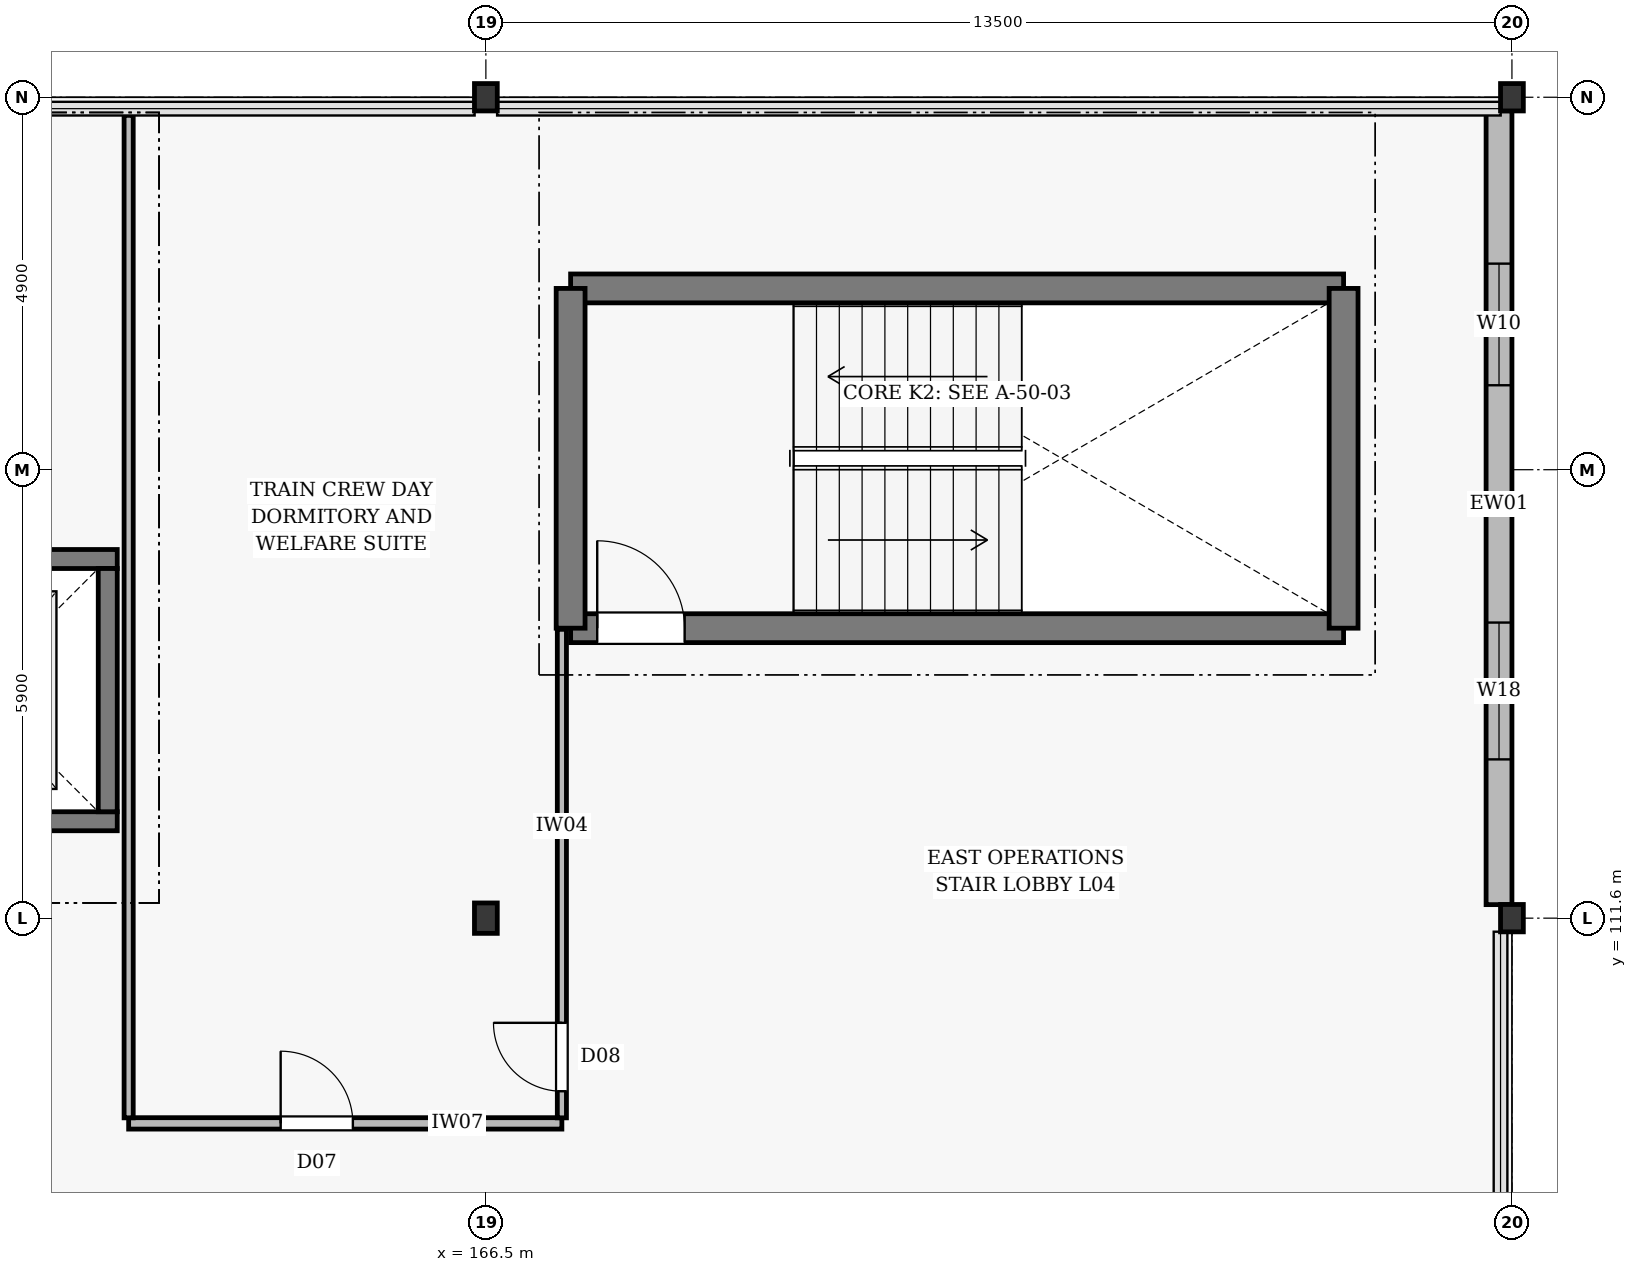
"""IFC4 building model, lengths in metres.
Left out: names, types, materials, properties, quantities, classifications, styles, units other than length and angle.
Written with IfcOpenShell. Run it as: python <this file> out.ifc"""

import sys

from ifc_helpers import new_model, si_unit, direction, frame, frame_2d, origin, origin_2d, place, context, subcontext, project, spatial, rectangle, i_section, extrude, element, fill, save


model = new_model("IFC4")
c1 = context("Model", 3, precision=1e-05, world=origin(), true_north=direction((0.0, 1.0)))
c2 = subcontext(c1, "Body", "Model", "MODEL_VIEW")
j1 = project(units=[si_unit("LENGTHUNIT", "METRE"), si_unit("PLANEANGLEUNIT", "RADIAN")], contexts=[c1])
p1 = place(None, origin())
s1 = spatial("IfcSite", under=j1, at=p1, CompositionType="ELEMENT")
p2 = place(p1, origin())
s2 = spatial("IfcBuilding", under=s1, at=p2, CompositionType="ELEMENT")
p3 = place(p2, frame((0.0, 0.0, 21.3)))
s3 = spatial("IfcBuildingStorey", under=s2, at=p3, CompositionType="ELEMENT", Elevation=21.3)
p4 = place(p3, frame((166.5, 111.6, 0.0), z_axis=(0.0, 0.0, 1.0), x_axis=(1.0, 0.0, 0.0)))
e1 = element("IfcColumn", 1, at=p4, inside=s3, PredefinedType="COLUMN", context=c2, shape_type="SweptSolid", body=[
    extrude(i_section(OverallWidth=0.3, OverallDepth=0.4, WebThickness=0.013, FlangeThickness=0.024, at=origin_2d()), origin(), (0.0, 0.0, 1.0), 3.9),
])
for number, where, z_axis, x_axis in (
    (2, (166.5, 122.4, 0.0), (0.0, 0.0, 1.0), (1.0, 0.0, 0.0)),
    (3, (180.0, 111.6, 0.0), (0.0, 0.0, 1.0), (1.0, 0.0, 0.0)),
    (4, (180.0, 122.4, 0.0), (0.0, 0.0, 1.0), (1.0, 0.0, 0.0)),
):
    element("IfcColumn", number, at=place(p3, frame(where, z_axis=z_axis, x_axis=x_axis)), inside=s3, PredefinedType="COLUMN", context=c2, shape_type="SweptSolid", body=[
        extrude(i_section(OverallWidth=0.3, OverallDepth=0.36, WebThickness=0.012, FlangeThickness=0.022, at=origin_2d()), origin(), (0.0, 0.0, 1.0), 3.9),
    ])
p5 = place(p3, frame((179.83, 122.222, 0.0), z_axis=(0.0, 0.0, 1.0), x_axis=(0.0, -1.0, 0.0)))
e5 = element("IfcWall", 5, at=p5, inside=s3, PredefinedType="STANDARD", context=c2, shape_type="SweptSolid", body=[
    extrude(rectangle(XDim=10.444, YDim=0.34, at=frame_2d((5.222, 0.0))), origin(), (0.0, 0.0, 1.0), 3.12),
])
p6 = place(p5, frame((2.011, 0.0, 0.75)))
e6 = element("IfcOpeningElement", 6, at=p6, cuts=e5, PredefinedType="OPENING", context=c2, shape_type="SweptSolid", body=[
    extrude(rectangle(XDim=1.6, YDim=2.1, at=frame_2d((0.8, 1.05))), frame((0.0, 0.182, 0.0), z_axis=(0.0, -1.0, 0.0), x_axis=(1.0, 0.0, 0.0)), (0.0, 0.0, 1.0), 0.364),
])
p7 = place(p5, frame((6.733, 0.0, 1.05)))
e7 = element("IfcOpeningElement", 7, at=p7, cuts=e5, PredefinedType="OPENING", context=c2, shape_type="SweptSolid", body=[
    extrude(rectangle(XDim=1.8, YDim=1.1, at=frame_2d((0.9, 0.55))), frame((0.0, 0.182, 0.0), z_axis=(0.0, -1.0, 0.0), x_axis=(1.0, 0.0, 0.0)), (0.0, 0.0, 1.0), 0.364),
])
p8 = place(p3, frame((167.615, 115.415, 0.0), z_axis=(0.0, 0.0, 1.0), x_axis=(1.0, 0.0, 0.0)))
e8 = element("IfcWall", 8, at=p8, inside=s3, PredefinedType="SOLIDWALL", context=c2, shape_type="SweptSolid", body=[
    extrude(rectangle(XDim=10.17, YDim=0.38, at=frame_2d((5.085, 0.0))), origin(), (0.0, 0.0, 1.0), 3.9),
])
p9 = place(p8, frame((0.35, 0.0, 0.005)))
e9 = element("IfcOpeningElement", 9, at=p9, cuts=e8, PredefinedType="OPENING", context=c2, shape_type="SweptSolid", body=[
    extrude(rectangle(XDim=1.15, YDim=2.15, at=frame_2d((0.575, 1.075))), frame((0.0, 0.202, 0.0), z_axis=(0.0, -1.0, 0.0), x_axis=(1.0, 0.0, 0.0)), (0.0, 0.0, 1.0), 0.404),
])
p10 = place(p3, frame((167.615, 119.885, 0.0), z_axis=(0.0, 0.0, 1.0), x_axis=(1.0, 0.0, 0.0)))
e10 = element("IfcWall", 10, at=p10, inside=s3, PredefinedType="SOLIDWALL", context=c2, shape_type="SweptSolid", body=[
    extrude(rectangle(XDim=10.17, YDim=0.38, at=frame_2d((5.085, 0.0))), origin(), (0.0, 0.0, 1.0), 3.9),
])
for number, where, z_axis, x_axis in (
    (11, (167.615, 115.415, 0.0), (0.0, 0.0, 1.0), (0.0, 1.0, 0.0)),
    (12, (177.785, 115.415, 0.0), (0.0, 0.0, 1.0), (0.0, 1.0, 0.0)),
):
    element("IfcWall", number, at=place(p3, frame(where, z_axis=z_axis, x_axis=x_axis)), inside=s3, PredefinedType="SOLIDWALL", context=c2, shape_type="SweptSolid", body=[
        extrude(rectangle(XDim=4.47, YDim=0.38, at=frame_2d((2.235, 0.0))), origin(), (0.0, 0.0, 1.0), 3.9),
    ])
p11 = place(p3, frame((157.95, 112.875, 0.0), z_axis=(0.0, 0.0, 1.0), x_axis=(1.0, 0.0, 0.0)))
e13 = element("IfcWall", 13, at=p11, inside=s3, PredefinedType="SOLIDWALL", context=c2, shape_type="SweptSolid", body=[
    extrude(rectangle(XDim=3.7, YDim=0.25, at=frame_2d((1.85, 0.0))), origin(), (0.0, 0.0, 1.0), 3.9),
])
p12 = place(p11, frame((1.225, 0.0, 0.005)))
e14 = element("IfcOpeningElement", 14, at=p12, cuts=e13, PredefinedType="OPENING", context=c2, shape_type="SweptSolid", body=[
    extrude(rectangle(XDim=1.25, YDim=2.2, at=frame_2d((0.625, 1.1))), frame((0.0, 0.137, 0.0), z_axis=(0.0, -1.0, 0.0), x_axis=(1.0, 0.0, 0.0)), (0.0, 0.0, 1.0), 0.274),
])
p13 = place(p3, frame((157.95, 116.325, 0.0), z_axis=(0.0, 0.0, 1.0), x_axis=(1.0, 0.0, 0.0)))
e15 = element("IfcWall", 15, at=p13, inside=s3, PredefinedType="SOLIDWALL", context=c2, shape_type="SweptSolid", body=[
    extrude(rectangle(XDim=3.7, YDim=0.25, at=frame_2d((1.85, 0.0))), origin(), (0.0, 0.0, 1.0), 3.9),
])
p14 = place(p3, frame((161.525, 113.0, 0.0), z_axis=(0.0, 0.0, 1.0), x_axis=(0.0, 1.0, 0.0)))
e16 = element("IfcWall", 16, at=p14, inside=s3, PredefinedType="SOLIDWALL", context=c2, shape_type="SweptSolid", body=[
    extrude(rectangle(XDim=3.2, YDim=0.25, at=frame_2d((1.6, 0.0))), origin(), (0.0, 0.0, 1.0), 3.9),
])
p15 = place(p3, frame((161.8, 108.9, 0.0), z_axis=(0.0, 0.0, 1.0), x_axis=(1.0, 0.0, 0.0)))
e17 = element("IfcWall", 17, at=p15, inside=s3, PredefinedType="PARTITIONING", context=c2, shape_type="SweptSolid", body=[
    extrude(rectangle(XDim=5.7, YDim=0.15, at=frame_2d((2.85, 0.0))), origin(), (0.0, 0.0, 1.0), 3.31),
])
p16 = place(p15, frame((2.0, 0.0, 0.005)))
e18 = element("IfcOpeningElement", 18, at=p16, cuts=e17, PredefinedType="OPENING", context=c2, shape_type="SweptSolid", body=[
    extrude(rectangle(XDim=0.95, YDim=2.1, at=frame_2d((0.475, 1.05))), frame((0.0, 0.087, 0.0), z_axis=(0.0, -1.0, 0.0), x_axis=(1.0, 0.0, 0.0)), (0.0, 0.0, 1.0), 0.174),
])
p17 = place(p3, frame((167.5, 108.973, 0.0), z_axis=(0.0, 0.0, 1.0), x_axis=(0.0, 1.0, 0.0)))
e19 = element("IfcWall", 19, at=p17, inside=s3, PredefinedType="PARTITIONING", context=c2, shape_type="SweptSolid", body=[
    extrude(rectangle(XDim=6.427, YDim=0.12, at=frame_2d((3.213, 0.0))), origin(), (0.0, 0.0, 1.0), 3.12),
])
p18 = place(p17, frame((0.35, 0.0, 0.005)))
e20 = element("IfcOpeningElement", 20, at=p18, cuts=e19, PredefinedType="OPENING", context=c2, shape_type="SweptSolid", body=[
    extrude(rectangle(XDim=0.9, YDim=2.1, at=frame_2d((0.45, 1.05))), frame((0.0, 0.072, 0.0), z_axis=(0.0, -1.0, 0.0), x_axis=(1.0, 0.0, 0.0)), (0.0, 0.0, 1.0), 0.144),
])
p19 = place(p3, frame((161.8, 108.973, 0.0), z_axis=(0.0, 0.0, 1.0), x_axis=(0.0, 1.0, 0.0)))
e21 = element("IfcWall", 21, at=p19, inside=s3, PredefinedType="PARTITIONING", context=c2, shape_type="SweptSolid", body=[
    extrude(rectangle(XDim=13.189, YDim=0.12, at=frame_2d((6.595, 0.0))), origin(), (0.0, 0.0, 1.0), 3.12),
])
p20 = place(p6, origin())
e22 = element("IfcWindow", 22, at=p20, inside=s3, PartitioningType="DOUBLE_PANEL_VERTICAL", PredefinedType="WINDOW", context=c2, shape_type="SweptSolid", body=[
    extrude(rectangle(XDim=1.6, YDim=2.1, at=frame_2d((0.8, 1.05))), frame((0.0, 0.03, 0.0), z_axis=(0.0, -1.0, 0.0), x_axis=(1.0, 0.0, 0.0)), (0.0, 0.0, 1.0), 0.06),
])
fill(e6, e22)
p21 = place(p7, origin())
e23 = element("IfcWindow", 23, at=p21, inside=s3, PartitioningType="DOUBLE_PANEL_VERTICAL", PredefinedType="WINDOW", context=c2, shape_type="SweptSolid", body=[
    extrude(rectangle(XDim=1.8, YDim=1.1, at=frame_2d((0.9, 0.55))), frame((0.0, 0.03, 0.0), z_axis=(0.0, -1.0, 0.0), x_axis=(1.0, 0.0, 0.0)), (0.0, 0.0, 1.0), 0.06),
])
fill(e7, e23)
p22 = place(p9, origin())
e24 = element("IfcDoor", 24, at=p22, inside=s3, OperationType="SINGLE_SWING_LEFT", PredefinedType="DOOR", context=c2, shape_type="SweptSolid", body=[
    extrude(rectangle(XDim=1.15, YDim=2.15, at=frame_2d((0.575, 1.075))), frame((0.0, 0.025, 0.0), z_axis=(0.0, -1.0, 0.0), x_axis=(1.0, 0.0, 0.0)), (0.0, 0.0, 1.0), 0.05),
])
fill(e9, e24)
p23 = place(p16, origin())
e25 = element("IfcDoor", 25, at=p23, inside=s3, OperationType="SINGLE_SWING_LEFT", PredefinedType="DOOR", context=c2, shape_type="SweptSolid", body=[
    extrude(rectangle(XDim=0.95, YDim=2.1, at=frame_2d((0.475, 1.05))), frame((0.0, 0.025, 0.0), z_axis=(0.0, -1.0, 0.0), x_axis=(1.0, 0.0, 0.0)), (0.0, 0.0, 1.0), 0.05),
])
fill(e18, e25)
p24 = place(p18, origin())
e26 = element("IfcDoor", 26, at=p24, inside=s3, OperationType="SINGLE_SWING_RIGHT", PredefinedType="DOOR", context=c2, shape_type="SweptSolid", body=[
    extrude(rectangle(XDim=0.9, YDim=2.1, at=frame_2d((0.45, 1.05))), frame((0.0, 0.025, 0.0), z_axis=(0.0, -1.0, 0.0), x_axis=(1.0, 0.0, 0.0)), (0.0, 0.0, 1.0), 0.05),
])
fill(e20, e26)
save(model, sys.argv[1])
